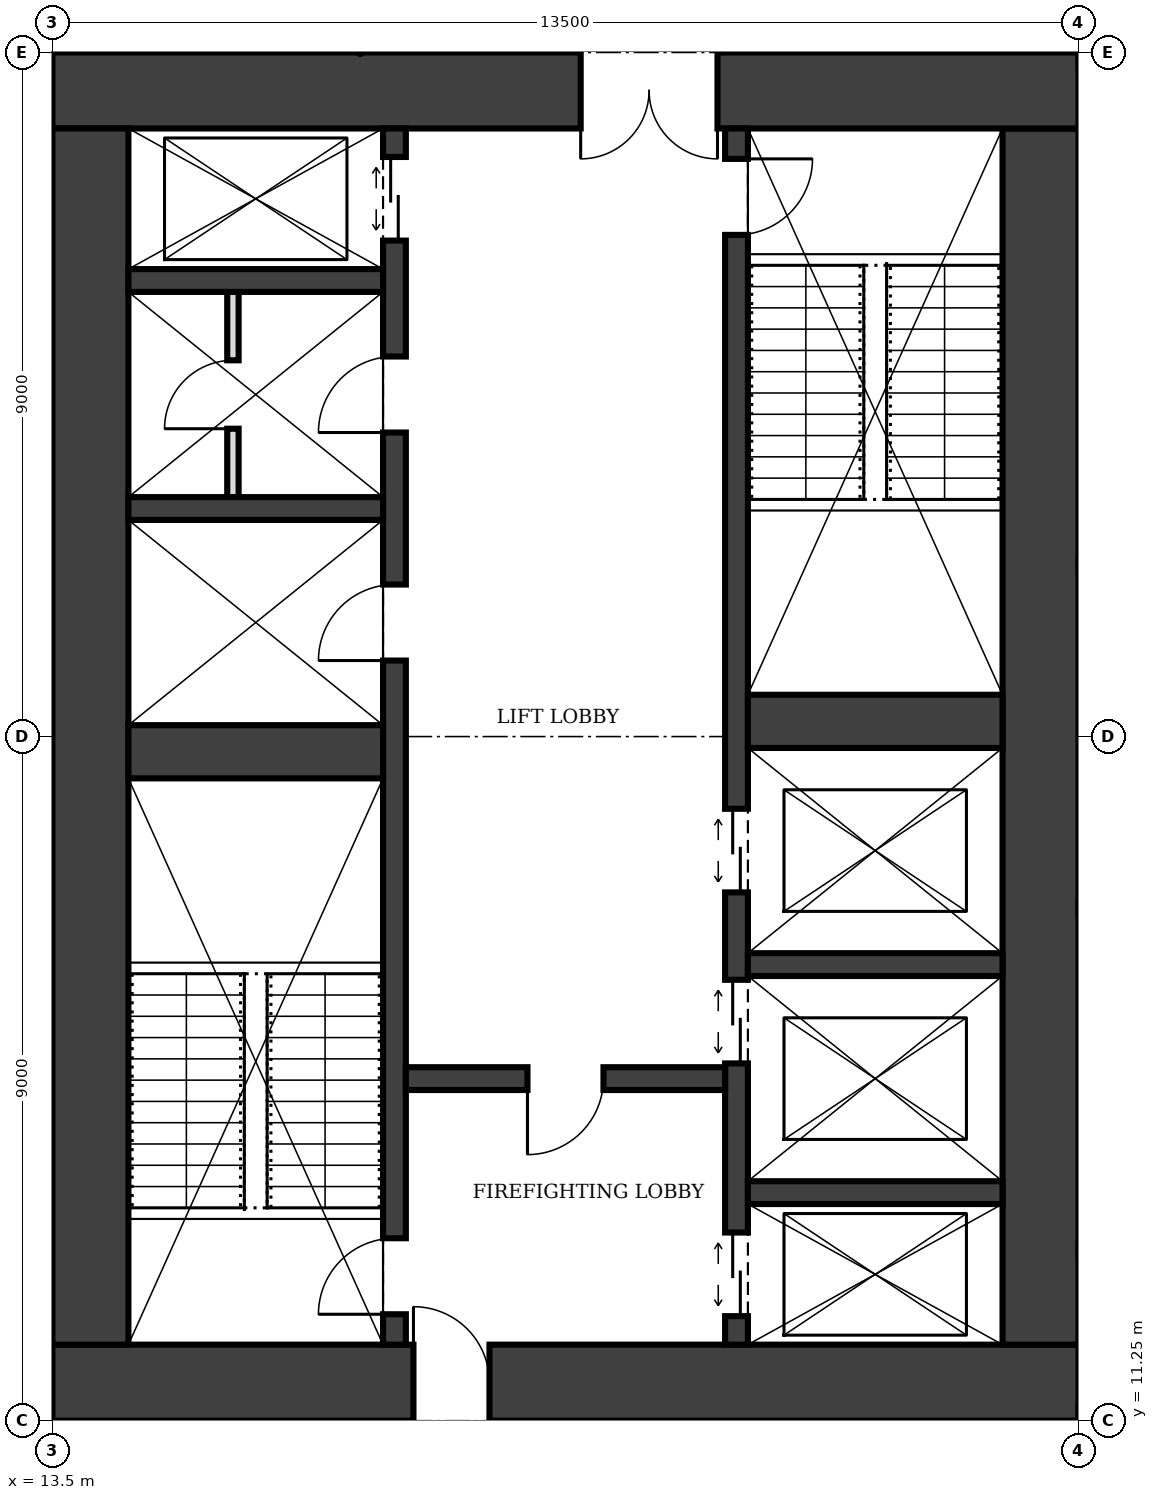
"""IFC4 building model, lengths in metres.
Left out: names, types, materials, properties, quantities, classifications, styles, units other than length and angle.
Written with IfcOpenShell. Run it as: python <this file> out.ifc"""

import sys

from ifc_helpers import new_model, si_unit, direction, frame, frame_2d, origin, place, context, subcontext, project, spatial, rectangle, extrude, element, fill, save


model = new_model("IFC4")
c1 = context("Model", 3, precision=1e-05, world=origin(), true_north=direction((0.0, 1.0)))
c2 = subcontext(c1, "Body", "Model", "MODEL_VIEW")
j1 = project(units=[si_unit("LENGTHUNIT", "METRE"), si_unit("PLANEANGLEUNIT", "RADIAN")], contexts=[c1])
p1 = place(None, origin())
s1 = spatial("IfcSite", under=j1, at=p1, CompositionType="ELEMENT")
p2 = place(p1, origin())
s2 = spatial("IfcBuilding", under=s1, at=p2, CompositionType="ELEMENT")
p3 = place(p2, frame((0.0, 0.0, 157.0)))
s3 = spatial("IfcBuildingStorey", under=s2, at=p3, CompositionType="ELEMENT", Elevation=157.0)
p4 = place(p3, frame((13.5, 11.75, 0.0), z_axis=(0.0, 0.0, 1.0), x_axis=(1.0, 0.0, 0.0)))
e1 = element("IfcWall", 1, at=p4, inside=s3, PredefinedType="SHEAR", context=c2, shape_type="SweptSolid", body=[
    extrude(rectangle(XDim=13.5, YDim=1.0, at=frame_2d((6.75, 0.0))), origin(), (0.0, 0.0, 1.0), 4.0),
])
p5 = place(p4, frame((4.75, 0.0, 0.0)))
e2 = element("IfcOpeningElement", 2, at=p5, cuts=e1, PredefinedType="OPENING", context=c2, shape_type="SweptSolid", body=[
    extrude(rectangle(XDim=1.0, YDim=2.1, at=frame_2d((0.5, 1.05))), frame((0.0, 0.51, 0.0), z_axis=(0.0, -1.0, 0.0), x_axis=(1.0, 0.0, 0.0)), (0.0, 0.0, 1.0), 1.02),
])
p6 = place(p3, frame((26.5, 12.25, 0.0), z_axis=(0.0, 0.0, 1.0), x_axis=(0.0, 1.0, 0.0)))
e3 = element("IfcWall", 3, at=p6, inside=s3, PredefinedType="SHEAR", context=c2, shape_type="SweptSolid", body=[
    extrude(rectangle(XDim=16.0, YDim=1.0, at=frame_2d((8.0, 0.0))), origin(), (0.0, 0.0, 1.0), 4.0),
])
p7 = place(p3, frame((27.0, 28.75, 0.0), z_axis=(0.0, 0.0, 1.0), x_axis=(-1.0, 0.0, 0.0)))
e4 = element("IfcWall", 4, at=p7, inside=s3, PredefinedType="SHEAR", context=c2, shape_type="SweptSolid", body=[
    extrude(rectangle(XDim=13.5, YDim=1.0, at=frame_2d((6.75, 0.0))), origin(), (0.0, 0.0, 1.0), 4.0),
])
p8 = place(p7, frame((4.75, 0.0, 0.0)))
e5 = element("IfcOpeningElement", 5, at=p8, cuts=e4, PredefinedType="OPENING", context=c2, shape_type="SweptSolid", body=[
    extrude(rectangle(XDim=1.8, YDim=2.1, at=frame_2d((0.9, 1.05))), frame((0.0, 0.51, 0.0), z_axis=(0.0, -1.0, 0.0), x_axis=(1.0, 0.0, 0.0)), (0.0, 0.0, 1.0), 1.02),
])
p9 = place(p3, frame((14.0, 28.25, 0.0), z_axis=(0.0, 0.0, 1.0), x_axis=(0.0, -1.0, 0.0)))
e6 = element("IfcWall", 6, at=p9, inside=s3, PredefinedType="SHEAR", context=c2, shape_type="SweptSolid", body=[
    extrude(rectangle(XDim=16.0, YDim=1.0, at=frame_2d((8.0, 0.0))), origin(), (0.0, 0.0, 1.0), 4.0),
])
p10 = place(p3, frame((18.0, 12.25, 0.0), z_axis=(0.0, 0.0, 1.0), x_axis=(0.0, 1.0, 0.0)))
e7 = element("IfcWall", 7, at=p10, inside=s3, PredefinedType="SHEAR", context=c2, shape_type="SweptSolid", body=[
    extrude(rectangle(XDim=16.0, YDim=0.3, at=frame_2d((8.0, 0.0))), origin(), (0.0, 0.0, 1.0), 4.0),
])
p11 = place(p10, frame((0.4, 0.0, 0.0)))
e8 = element("IfcOpeningElement", 8, at=p11, cuts=e7, PredefinedType="OPENING", context=c2, shape_type="SweptSolid", body=[
    extrude(rectangle(XDim=1.0, YDim=2.1, at=frame_2d((0.5, 1.05))), frame((0.0, 0.16, 0.0), z_axis=(0.0, -1.0, 0.0), x_axis=(1.0, 0.0, 0.0)), (0.0, 0.0, 1.0), 0.32),
])
p12 = place(p10, frame((14.525, 0.0, 0.0)))
e9 = element("IfcOpeningElement", 9, at=p12, cuts=e7, PredefinedType="OPENING", context=c2, shape_type="SweptSolid", body=[
    extrude(rectangle(XDim=1.1, YDim=2.1, at=frame_2d((0.55, 1.05))), frame((0.0, 0.16, 0.0), z_axis=(0.0, -1.0, 0.0), x_axis=(1.0, 0.0, 0.0)), (0.0, 0.0, 1.0), 0.32),
])
p13 = place(p10, frame((9.0, 0.0, 0.0)))
e10 = element("IfcOpeningElement", 10, at=p13, cuts=e7, PredefinedType="OPENING", context=c2, shape_type="SweptSolid", body=[
    extrude(rectangle(XDim=1.0, YDim=2.1, at=frame_2d((0.5, 1.05))), frame((0.0, 0.16, 0.0), z_axis=(0.0, -1.0, 0.0), x_axis=(1.0, 0.0, 0.0)), (0.0, 0.0, 1.0), 0.32),
])
p14 = place(p10, frame((12.0, 0.0, 0.0)))
e11 = element("IfcOpeningElement", 11, at=p14, cuts=e7, PredefinedType="OPENING", context=c2, shape_type="SweptSolid", body=[
    extrude(rectangle(XDim=1.0, YDim=2.1, at=frame_2d((0.5, 1.05))), frame((0.0, 0.16, 0.0), z_axis=(0.0, -1.0, 0.0), x_axis=(1.0, 0.0, 0.0)), (0.0, 0.0, 1.0), 0.32),
])
p15 = place(p3, frame((22.5, 12.25, 0.0), z_axis=(0.0, 0.0, 1.0), x_axis=(0.0, 1.0, 0.0)))
e12 = element("IfcWall", 12, at=p15, inside=s3, PredefinedType="SHEAR", context=c2, shape_type="SweptSolid", body=[
    extrude(rectangle(XDim=16.0, YDim=0.3, at=frame_2d((8.0, 0.0))), origin(), (0.0, 0.0, 1.0), 4.0),
])
p16 = place(p15, frame((14.6, 0.0, 0.0)))
e13 = element("IfcOpeningElement", 13, at=p16, cuts=e12, PredefinedType="OPENING", context=c2, shape_type="SweptSolid", body=[
    extrude(rectangle(XDim=1.0, YDim=2.1, at=frame_2d((0.5, 1.05))), frame((0.0, 0.16, 0.0), z_axis=(0.0, -1.0, 0.0), x_axis=(1.0, 0.0, 0.0)), (0.0, 0.0, 1.0), 0.32),
])
p17 = place(p15, frame((0.375, 0.0, 0.0)))
e14 = element("IfcOpeningElement", 14, at=p17, cuts=e12, PredefinedType="OPENING", context=c2, shape_type="SweptSolid", body=[
    extrude(rectangle(XDim=1.1, YDim=2.1, at=frame_2d((0.55, 1.05))), frame((0.0, 0.16, 0.0), z_axis=(0.0, -1.0, 0.0), x_axis=(1.0, 0.0, 0.0)), (0.0, 0.0, 1.0), 0.32),
])
p18 = place(p15, frame((3.7, 0.0, 0.0)))
e15 = element("IfcOpeningElement", 15, at=p18, cuts=e12, PredefinedType="OPENING", context=c2, shape_type="SweptSolid", body=[
    extrude(rectangle(XDim=1.1, YDim=2.1, at=frame_2d((0.55, 1.05))), frame((0.0, 0.16, 0.0), z_axis=(0.0, -1.0, 0.0), x_axis=(1.0, 0.0, 0.0)), (0.0, 0.0, 1.0), 0.32),
])
p19 = place(p15, frame((5.95, 0.0, 0.0)))
e16 = element("IfcOpeningElement", 16, at=p19, cuts=e12, PredefinedType="OPENING", context=c2, shape_type="SweptSolid", body=[
    extrude(rectangle(XDim=1.1, YDim=2.1, at=frame_2d((0.55, 1.05))), frame((0.0, 0.16, 0.0), z_axis=(0.0, -1.0, 0.0), x_axis=(1.0, 0.0, 0.0)), (0.0, 0.0, 1.0), 0.32),
])
p20 = place(p3, frame((14.5, 20.05, 0.0), z_axis=(0.0, 0.0, 1.0), x_axis=(1.0, 0.0, 0.0)))
e17 = element("IfcWall", 17, at=p20, inside=s3, PredefinedType="SHEAR", context=c2, shape_type="SweptSolid", body=[
    extrude(rectangle(XDim=3.35, YDim=0.7, at=frame_2d((1.675, 0.0))), origin(), (0.0, 0.0, 1.0), 4.0),
])
p21 = place(p3, frame((18.15, 15.75, 0.0), z_axis=(0.0, 0.0, 1.0), x_axis=(1.0, 0.0, 0.0)))
e18 = element("IfcWall", 18, at=p21, inside=s3, PredefinedType="SHEAR", context=c2, shape_type="SweptSolid", body=[
    extrude(rectangle(XDim=4.2, YDim=0.3, at=frame_2d((2.1, 0.0))), origin(), (0.0, 0.0, 1.0), 4.0),
])
p22 = place(p21, frame((1.6, 0.0, 0.0)))
e19 = element("IfcOpeningElement", 19, at=p22, cuts=e18, PredefinedType="OPENING", context=c2, shape_type="SweptSolid", body=[
    extrude(rectangle(XDim=1.0, YDim=2.1, at=frame_2d((0.5, 1.05))), frame((0.0, 0.16, 0.0), z_axis=(0.0, -1.0, 0.0), x_axis=(1.0, 0.0, 0.0)), (0.0, 0.0, 1.0), 0.32),
])
for number, where, z_axis, x_axis in (
    (20, (22.65, 14.25, 0.0), (0.0, 0.0, 1.0), (1.0, 0.0, 0.0)),
    (21, (22.65, 17.25, 0.0), (0.0, 0.0, 1.0), (1.0, 0.0, 0.0)),
):
    element("IfcWall", number, at=place(p3, frame(where, z_axis=z_axis, x_axis=x_axis)), inside=s3, PredefinedType="SHEAR", context=c2, shape_type="SweptSolid", body=[
        extrude(rectangle(XDim=3.35, YDim=0.3, at=frame_2d((1.675, 0.0))), origin(), (0.0, 0.0, 1.0), 4.0),
    ])
p23 = place(p3, frame((22.65, 20.45, 0.0), z_axis=(0.0, 0.0, 1.0), x_axis=(1.0, 0.0, 0.0)))
e22 = element("IfcWall", 22, at=p23, inside=s3, PredefinedType="SHEAR", context=c2, shape_type="SweptSolid", body=[
    extrude(rectangle(XDim=3.35, YDim=0.7, at=frame_2d((1.675, 0.0))), origin(), (0.0, 0.0, 1.0), 4.0),
])
for number, where, z_axis, x_axis in (
    (23, (14.5, 23.25, 0.0), (0.0, 0.0, 1.0), (1.0, 0.0, 0.0)),
    (24, (14.5, 26.25, 0.0), (0.0, 0.0, 1.0), (1.0, 0.0, 0.0)),
):
    element("IfcWall", number, at=place(p3, frame(where, z_axis=z_axis, x_axis=x_axis)), inside=s3, PredefinedType="SHEAR", context=c2, shape_type="SweptSolid", body=[
        extrude(rectangle(XDim=3.35, YDim=0.3, at=frame_2d((1.675, 0.0))), origin(), (0.0, 0.0, 1.0), 4.0),
    ])
p24 = place(p3, frame((15.875, 23.4, 0.0), z_axis=(0.0, 0.0, 1.0), x_axis=(0.0, 1.0, 0.0)))
e25 = element("IfcWall", 25, at=p24, inside=s3, PredefinedType="PARTITIONING", context=c2, shape_type="SweptSolid", body=[
    extrude(rectangle(XDim=2.7, YDim=0.15, at=frame_2d((1.35, 0.0))), origin(), (0.0, 0.0, 1.0), 3.75),
])
p25 = place(p24, frame((0.9, 0.0, 0.0)))
e26 = element("IfcOpeningElement", 26, at=p25, cuts=e25, PredefinedType="OPENING", context=c2, shape_type="SweptSolid", body=[
    extrude(rectangle(XDim=0.9, YDim=2.1, at=frame_2d((0.45, 1.05))), frame((0.0, 0.085, 0.0), z_axis=(0.0, -1.0, 0.0), x_axis=(1.0, 0.0, 0.0)), (0.0, 0.0, 1.0), 0.17),
])
for number, where, z_axis, x_axis in (
    (27, (27.0, 11.35, 0.0), (0.0, 0.0, 1.0), (1.0, 0.0, 0.0)),
    (28, (27.0, 29.15, 0.0), (0.0, 0.0, 1.0), (1.0, 0.0, 0.0)),
):
    element("IfcWall", number, at=place(p3, frame(where, z_axis=z_axis, x_axis=x_axis)), inside=s3, PredefinedType="SOLIDWALL", context=c2, shape_type="SweptSolid", body=[
        extrude(rectangle(XDim=7.93, YDim=0.2, at=frame_2d((3.965, 0.0))), origin(), (0.0, 0.0, 1.0), 2.85),
    ])
p26 = place(p5, origin())
e29 = element("IfcDoor", 29, at=p26, inside=s3, OperationType="SINGLE_SWING_LEFT", PredefinedType="DOOR", context=c2, shape_type="SweptSolid", body=[
    extrude(rectangle(XDim=1.0, YDim=2.1, at=frame_2d((0.5, 1.05))), frame((0.0, 0.025, 0.0), z_axis=(0.0, -1.0, 0.0), x_axis=(1.0, 0.0, 0.0)), (0.0, 0.0, 1.0), 0.05),
])
fill(e2, e29)
p27 = place(p8, origin())
e30 = element("IfcDoor", 30, at=p27, inside=s3, OperationType="DOUBLE_DOOR_SINGLE_SWING", PredefinedType="DOOR", context=c2, shape_type="SweptSolid", body=[
    extrude(rectangle(XDim=1.8, YDim=2.1, at=frame_2d((0.9, 1.05))), frame((0.0, 0.025, 0.0), z_axis=(0.0, -1.0, 0.0), x_axis=(1.0, 0.0, 0.0)), (0.0, 0.0, 1.0), 0.05),
])
fill(e5, e30)
p28 = place(p22, frame((1.0, 0.0, 0.0), z_axis=(0.0, 0.0, 1.0), x_axis=(-1.0, 0.0, 0.0)))
e31 = element("IfcDoor", 31, at=p28, inside=s3, OperationType="SINGLE_SWING_RIGHT", PredefinedType="DOOR", context=c2, shape_type="SweptSolid", body=[
    extrude(rectangle(XDim=1.0, YDim=2.1, at=frame_2d((0.5, 1.05))), frame((0.0, 0.025, 0.0), z_axis=(0.0, -1.0, 0.0), x_axis=(1.0, 0.0, 0.0)), (0.0, 0.0, 1.0), 0.05),
])
fill(e19, e31)
p29 = place(p11, origin())
e32 = element("IfcDoor", 32, at=p29, inside=s3, OperationType="SINGLE_SWING_LEFT", PredefinedType="DOOR", context=c2, shape_type="SweptSolid", body=[
    extrude(rectangle(XDim=1.0, YDim=2.1, at=frame_2d((0.5, 1.05))), frame((0.0, 0.025, 0.0), z_axis=(0.0, -1.0, 0.0), x_axis=(1.0, 0.0, 0.0)), (0.0, 0.0, 1.0), 0.05),
])
fill(e8, e32)
p30 = place(p16, frame((1.0, 0.0, 0.0), z_axis=(0.0, 0.0, 1.0), x_axis=(-1.0, 0.0, 0.0)))
e33 = element("IfcDoor", 33, at=p30, inside=s3, OperationType="SINGLE_SWING_LEFT", PredefinedType="DOOR", context=c2, shape_type="SweptSolid", body=[
    extrude(rectangle(XDim=1.0, YDim=2.1, at=frame_2d((0.5, 1.05))), frame((0.0, 0.025, 0.0), z_axis=(0.0, -1.0, 0.0), x_axis=(1.0, 0.0, 0.0)), (0.0, 0.0, 1.0), 0.05),
])
fill(e13, e33)
p31 = place(p17, origin())
e34 = element("IfcDoor", 34, at=p31, inside=s3, OperationType="DOUBLE_DOOR_SLIDING", PredefinedType="DOOR", context=c2, shape_type="SweptSolid", body=[
    extrude(rectangle(XDim=1.1, YDim=2.1, at=frame_2d((0.55, 1.05))), frame((0.0, 0.025, 0.0), z_axis=(0.0, -1.0, 0.0), x_axis=(1.0, 0.0, 0.0)), (0.0, 0.0, 1.0), 0.05),
])
fill(e14, e34)
p32 = place(p12, origin())
e35 = element("IfcDoor", 35, at=p32, inside=s3, OperationType="DOUBLE_DOOR_SLIDING", PredefinedType="DOOR", context=c2, shape_type="SweptSolid", body=[
    extrude(rectangle(XDim=1.1, YDim=2.1, at=frame_2d((0.55, 1.05))), frame((0.0, 0.025, 0.0), z_axis=(0.0, -1.0, 0.0), x_axis=(1.0, 0.0, 0.0)), (0.0, 0.0, 1.0), 0.05),
])
fill(e9, e35)
p33 = place(p18, origin())
e36 = element("IfcDoor", 36, at=p33, inside=s3, OperationType="DOUBLE_DOOR_SLIDING", PredefinedType="DOOR", context=c2, shape_type="SweptSolid", body=[
    extrude(rectangle(XDim=1.1, YDim=2.1, at=frame_2d((0.55, 1.05))), frame((0.0, 0.025, 0.0), z_axis=(0.0, -1.0, 0.0), x_axis=(1.0, 0.0, 0.0)), (0.0, 0.0, 1.0), 0.05),
])
fill(e15, e36)
p34 = place(p19, origin())
e37 = element("IfcDoor", 37, at=p34, inside=s3, OperationType="DOUBLE_DOOR_SLIDING", PredefinedType="DOOR", context=c2, shape_type="SweptSolid", body=[
    extrude(rectangle(XDim=1.1, YDim=2.1, at=frame_2d((0.55, 1.05))), frame((0.0, 0.025, 0.0), z_axis=(0.0, -1.0, 0.0), x_axis=(1.0, 0.0, 0.0)), (0.0, 0.0, 1.0), 0.05),
])
fill(e16, e37)
p35 = place(p13, origin())
e38 = element("IfcDoor", 38, at=p35, inside=s3, OperationType="SINGLE_SWING_LEFT", PredefinedType="DOOR", context=c2, shape_type="SweptSolid", body=[
    extrude(rectangle(XDim=1.0, YDim=2.1, at=frame_2d((0.5, 1.05))), frame((0.0, 0.025, 0.0), z_axis=(0.0, -1.0, 0.0), x_axis=(1.0, 0.0, 0.0)), (0.0, 0.0, 1.0), 0.05),
])
fill(e10, e38)
p36 = place(p14, origin())
e39 = element("IfcDoor", 39, at=p36, inside=s3, OperationType="SINGLE_SWING_LEFT", PredefinedType="DOOR", context=c2, shape_type="SweptSolid", body=[
    extrude(rectangle(XDim=1.0, YDim=2.1, at=frame_2d((0.5, 1.05))), frame((0.0, 0.025, 0.0), z_axis=(0.0, -1.0, 0.0), x_axis=(1.0, 0.0, 0.0)), (0.0, 0.0, 1.0), 0.05),
])
fill(e11, e39)
p37 = place(p25, origin())
e40 = element("IfcDoor", 40, at=p37, inside=s3, OperationType="SINGLE_SWING_LEFT", PredefinedType="DOOR", context=c2, shape_type="SweptSolid", body=[
    extrude(rectangle(XDim=0.9, YDim=2.1, at=frame_2d((0.45, 1.05))), frame((0.0, 0.025, 0.0), z_axis=(0.0, -1.0, 0.0), x_axis=(1.0, 0.0, 0.0)), (0.0, 0.0, 1.0), 0.05),
])
fill(e26, e40)
save(model, sys.argv[1])
